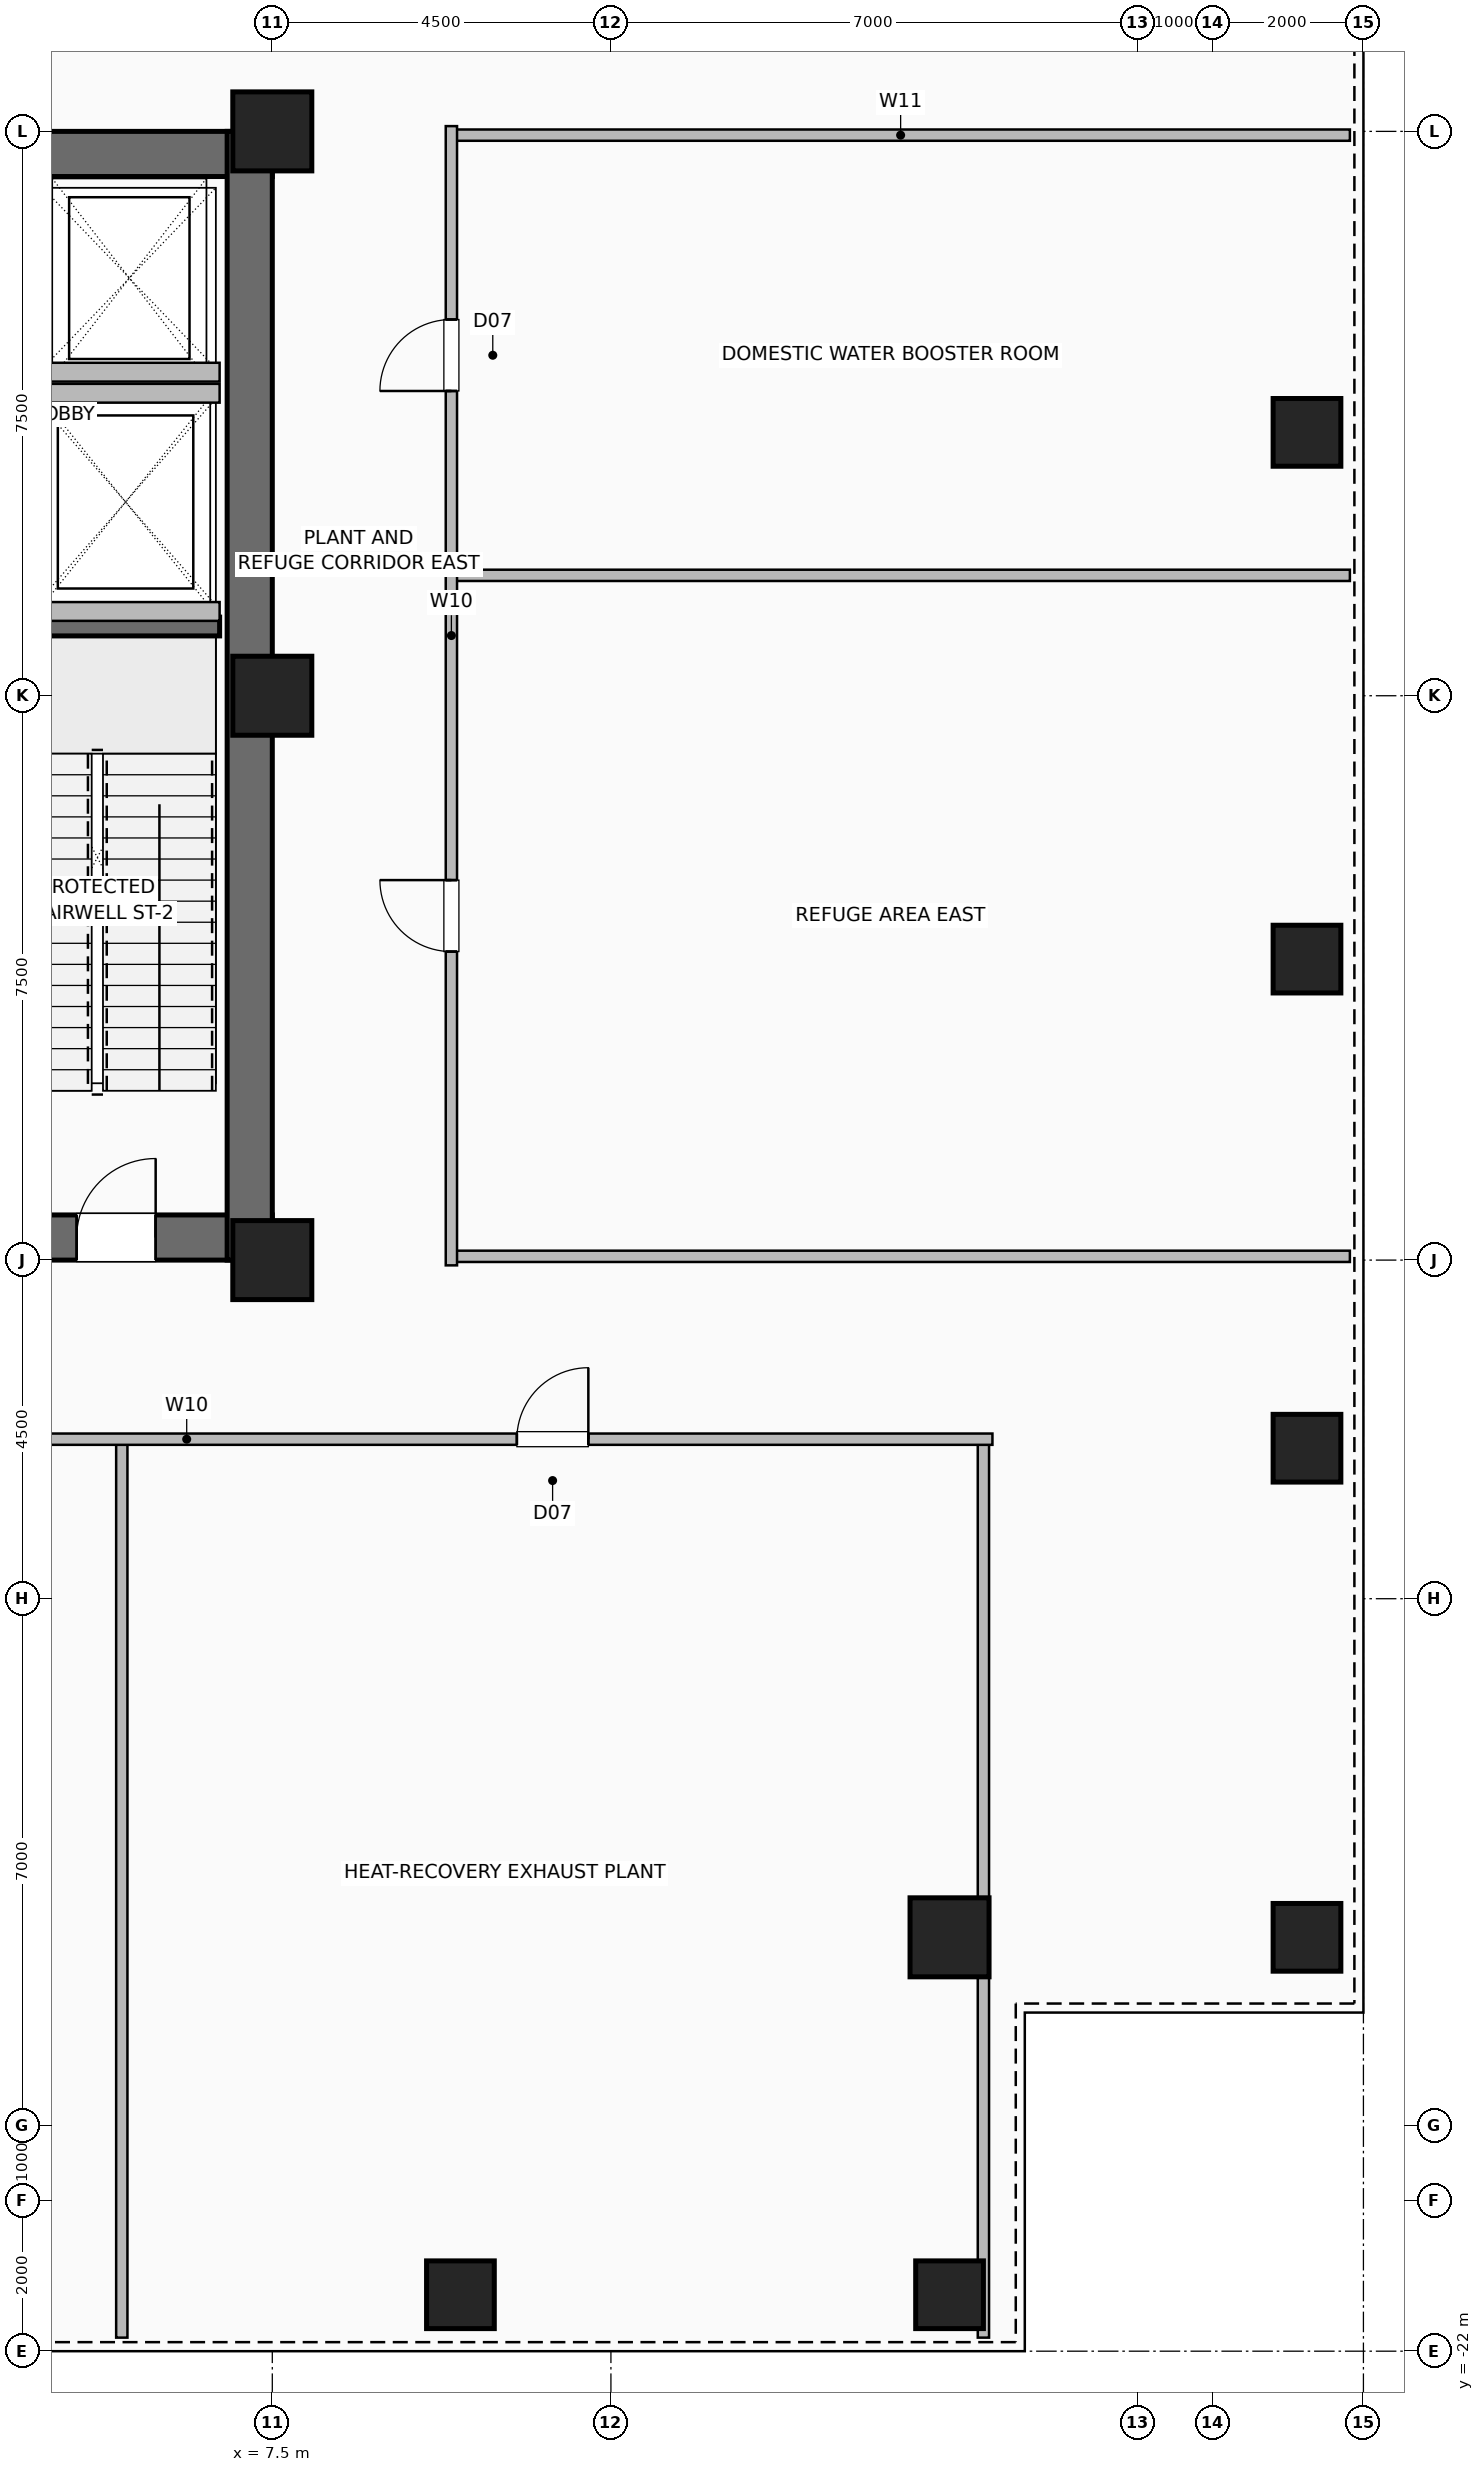
"""IFC4 building model, lengths in metres.
Left out: names, types, materials, properties, quantities, classifications, styles, units other than length and angle.
Written with IfcOpenShell. Run it as: python <this file> out.ifc"""

import sys

from ifc_helpers import new_model, si_unit, direction, frame, frame_2d, origin, origin_2d, place, context, subcontext, project, spatial, rectangle, hollow_rectangle, extrude, element, fill, save


model = new_model("IFC4")
c1 = context("Model", 3, precision=1e-05, world=origin(), true_north=direction((0.0, 1.0)))
c2 = subcontext(c1, "Body", "Model", "MODEL_VIEW")
j1 = project(units=[si_unit("LENGTHUNIT", "METRE"), si_unit("PLANEANGLEUNIT", "RADIAN")], contexts=[c1])
p1 = place(None, origin())
s1 = spatial("IfcSite", under=j1, at=p1, CompositionType="ELEMENT")
p2 = place(p1, origin())
s2 = spatial("IfcBuilding", under=s1, at=p2, CompositionType="ELEMENT")
p3 = place(p2, frame((0.0, 0.0, 160.2)))
s3 = spatial("IfcBuildingStorey", under=s2, at=p3, CompositionType="ELEMENT", Elevation=160.2)
for number, where, z_axis, x_axis in (
    (1, (7.5, -7.5, 0.0), (0.0, 0.0, 1.0), (1.0, 0.0, 0.0)),
    (2, (7.5, 0.0, 0.0), (0.0, 0.0, 1.0), (1.0, 0.0, 0.0)),
    (3, (7.5, 7.5, 0.0), (0.0, 0.0, 1.0), (1.0, 0.0, 0.0)),
):
    element("IfcColumn", number, at=place(p3, frame(where, z_axis=z_axis, x_axis=x_axis)), inside=s3, PredefinedType="COLUMN", context=c2, shape_type="SweptSolid", body=[
        extrude(hollow_rectangle(XDim=1.05, YDim=1.05, WallThickness=0.05, at=origin_2d()), origin(), (0.0, 0.0, 1.0), 6.0),
    ])
for number, where, z_axis, x_axis in (
    (4, (21.25, -16.5, 0.0), (0.0, 0.0, 1.0), (1.0, 0.0, 0.0)),
    (5, (21.25, -10.0, 0.0), (0.0, 0.0, 1.0), (1.0, 0.0, 0.0)),
    (6, (21.25, -3.5, 0.0), (0.0, 0.0, 1.0), (1.0, 0.0, 0.0)),
    (7, (21.25, 3.5, 0.0), (0.0, 0.0, 1.0), (1.0, 0.0, 0.0)),
    (8, (10.0, -21.25, 0.0), (0.0, 0.0, 1.0), (1.0, 0.0, 0.0)),
    (9, (16.5, -21.25, 0.0), (0.0, 0.0, 1.0), (1.0, 0.0, 0.0)),
):
    element("IfcColumn", number, at=place(p3, frame(where, z_axis=z_axis, x_axis=x_axis)), inside=s3, PredefinedType="COLUMN", context=c2, shape_type="SweptSolid", body=[
        extrude(hollow_rectangle(XDim=0.9, YDim=0.9, WallThickness=0.045, at=origin_2d()), origin(), (0.0, 0.0, 1.0), 5.6),
    ])
p4 = place(p3, frame((16.5, -16.5, 0.0), z_axis=(0.0, 0.0, 1.0), x_axis=(1.0, 0.0, 0.0)))
e10 = element("IfcColumn", 10, at=p4, inside=s3, PredefinedType="COLUMN", context=c2, shape_type="SweptSolid", body=[
    extrude(hollow_rectangle(XDim=1.05, YDim=1.05, WallThickness=0.05, at=origin_2d()), origin(), (0.0, 0.0, 1.0), 5.6),
])
p5 = place(p3, frame((-7.5, -7.2, 0.0), z_axis=(0.0, 0.0, 1.0), x_axis=(1.0, 0.0, 0.0)))
e11 = element("IfcWall", 11, at=p5, inside=s3, PredefinedType="SHEAR", context=c2, shape_type="SweptSolid", body=[
    extrude(rectangle(XDim=15.0, YDim=0.6, at=frame_2d((7.5, 0.0))), origin(), (0.0, 0.0, 1.0), 5.6),
])
p6 = place(p5, frame((1.55, 0.0, 0.0)))
e12 = element("IfcOpeningElement", 12, at=p6, cuts=e11, PredefinedType="OPENING", context=c2, shape_type="SweptSolid", body=[
    extrude(rectangle(XDim=1.05, YDim=2.08, at=frame_2d((0.525, 1.04))), frame((0.0, 0.31, 0.0), z_axis=(0.0, -1.0, 0.0), x_axis=(1.0, 0.0, 0.0)), (0.0, 0.0, 1.0), 0.62),
])
p7 = place(p5, frame((12.4, 0.0, 0.0)))
e13 = element("IfcOpeningElement", 13, at=p7, cuts=e11, PredefinedType="OPENING", context=c2, shape_type="SweptSolid", body=[
    extrude(rectangle(XDim=1.05, YDim=2.08, at=frame_2d((0.525, 1.04))), frame((0.0, 0.31, 0.0), z_axis=(0.0, -1.0, 0.0), x_axis=(1.0, 0.0, 0.0)), (0.0, 0.0, 1.0), 0.62),
])
p8 = place(p5, frame((4.95, 0.0, 0.0)))
e14 = element("IfcOpeningElement", 14, at=p8, cuts=e11, PredefinedType="OPENING", context=c2, shape_type="SweptSolid", body=[
    extrude(rectangle(XDim=1.0, YDim=2.08, at=frame_2d((0.5, 1.04))), frame((0.0, 0.31, 0.0), z_axis=(0.0, -1.0, 0.0), x_axis=(1.0, 0.0, 0.0)), (0.0, 0.0, 1.0), 0.62),
])
p9 = place(p5, frame((7.05, 0.0, 0.0)))
e15 = element("IfcOpeningElement", 15, at=p9, cuts=e11, PredefinedType="OPENING", context=c2, shape_type="SweptSolid", body=[
    extrude(rectangle(XDim=1.0, YDim=2.08, at=frame_2d((0.5, 1.04))), frame((0.0, 0.31, 0.0), z_axis=(0.0, -1.0, 0.0), x_axis=(1.0, 0.0, 0.0)), (0.0, 0.0, 1.0), 0.62),
])
p10 = place(p5, frame((9.15, 0.0, 0.0)))
e16 = element("IfcOpeningElement", 16, at=p10, cuts=e11, PredefinedType="OPENING", context=c2, shape_type="SweptSolid", body=[
    extrude(rectangle(XDim=1.0, YDim=2.08, at=frame_2d((0.5, 1.04))), frame((0.0, 0.31, 0.0), z_axis=(0.0, -1.0, 0.0), x_axis=(1.0, 0.0, 0.0)), (0.0, 0.0, 1.0), 0.62),
])
for number, where, z_axis, x_axis in (
    (17, (-7.5, 7.2, 0.0), (0.0, 0.0, 1.0), (1.0, 0.0, 0.0)),
    (18, (7.2, -7.5, 0.0), (0.0, 0.0, 1.0), (0.0, 1.0, 0.0)),
):
    element("IfcWall", number, at=place(p3, frame(where, z_axis=z_axis, x_axis=x_axis)), inside=s3, PredefinedType="SHEAR", context=c2, shape_type="SweptSolid", body=[
        extrude(rectangle(XDim=15.0, YDim=0.6, at=frame_2d((7.5, 0.0))), origin(), (0.0, 0.0, 1.0), 5.6),
    ])
p11 = place(p3, frame((3.47, 0.92, 0.0), z_axis=(0.0, 0.0, 1.0), x_axis=(1.0, 0.0, 0.0)))
e19 = element("IfcWall", 19, at=p11, inside=s3, PredefinedType="SHEAR", context=c2, shape_type="SweptSolid", body=[
    extrude(rectangle(XDim=3.33, YDim=0.25, at=frame_2d((1.665, 0.0))), origin(), (0.0, 0.0, 1.0), 5.6),
])
p12 = place(p3, frame((4.38, 4.3, 0.0), z_axis=(0.0, 0.0, 1.0), x_axis=(1.0, 0.0, 0.0)))
e20 = element("IfcWall", 20, at=p12, inside=s3, PredefinedType="SHEAR", context=c2, shape_type="SweptSolid", body=[
    extrude(rectangle(XDim=2.42, YDim=0.25, at=frame_2d((1.21, 0.0))), origin(), (0.0, 0.0, 1.0), 5.6),
])
for number, where, z_axis, x_axis in (
    (21, (4.28, 1.12, 0.0), (0.0, 0.0, 1.0), (1.0, 0.0, 0.0)),
    (22, (4.28, 4.02, 0.0), (0.0, 0.0, 1.0), (1.0, 0.0, 0.0)),
):
    element("IfcWall", number, at=place(p3, frame(where, z_axis=z_axis, x_axis=x_axis)), inside=s3, PredefinedType="SHEAR", context=c2, shape_type="SweptSolid", body=[
        extrude(rectangle(XDim=2.52, YDim=0.25, at=frame_2d((1.26, 0.0))), origin(), (0.0, 0.0, 1.0), 5.6),
    ])
for number, where, z_axis, x_axis in (
    (23, (5.5, -21.82, 0.0), (0.0, 0.0, 1.0), (0.0, 1.0, 0.0)),
    (24, (16.95, -21.82, 0.0), (0.0, 0.0, 1.0), (0.0, 1.0, 0.0)),
):
    element("IfcWall", number, at=place(p3, frame(where, z_axis=z_axis, x_axis=x_axis)), inside=s3, PredefinedType="PARTITIONING", context=c2, shape_type="SweptSolid", body=[
        extrude(rectangle(XDim=11.94, YDim=0.15, at=frame_2d((5.97, 0.0))), origin(), (0.0, 0.0, 1.0), 5.6),
    ])
p13 = place(p3, frame((-17.07, -9.88, 0.0), z_axis=(0.0, 0.0, 1.0), x_axis=(1.0, 0.0, 0.0)))
e25 = element("IfcWall", 25, at=p13, inside=s3, PredefinedType="PARTITIONING", context=c2, shape_type="SweptSolid", body=[
    extrude(rectangle(XDim=34.14, YDim=0.15, at=frame_2d((17.07, 0.0))), origin(), (0.0, 0.0, 1.0), 5.6),
])
p14 = place(p13, frame((5.37, 0.0, 0.0)))
e26 = element("IfcOpeningElement", 26, at=p14, cuts=e25, PredefinedType="OPENING", context=c2, shape_type="SweptSolid", body=[
    extrude(rectangle(XDim=0.95, YDim=2.06, at=frame_2d((0.475, 1.03))), frame((0.0, 0.085, 0.0), z_axis=(0.0, -1.0, 0.0), x_axis=(1.0, 0.0, 0.0)), (0.0, 0.0, 1.0), 0.17),
])
p15 = place(p13, frame((11.825, 0.0, 0.0)))
e27 = element("IfcOpeningElement", 27, at=p15, cuts=e25, PredefinedType="OPENING", context=c2, shape_type="SweptSolid", body=[
    extrude(rectangle(XDim=0.85, YDim=2.05, at=frame_2d((0.425, 1.025))), frame((0.0, 0.085, 0.0), z_axis=(0.0, -1.0, 0.0), x_axis=(1.0, 0.0, 0.0)), (0.0, 0.0, 1.0), 0.17),
])
p16 = place(p13, frame((13.275, 0.0, 0.0)))
e28 = element("IfcOpeningElement", 28, at=p16, cuts=e25, PredefinedType="OPENING", context=c2, shape_type="SweptSolid", body=[
    extrude(rectangle(XDim=0.95, YDim=2.06, at=frame_2d((0.475, 1.03))), frame((0.0, 0.085, 0.0), z_axis=(0.0, -1.0, 0.0), x_axis=(1.0, 0.0, 0.0)), (0.0, 0.0, 1.0), 0.17),
])
p17 = place(p13, frame((18.095, 0.0, 0.0)))
e29 = element("IfcOpeningElement", 29, at=p17, cuts=e25, PredefinedType="OPENING", context=c2, shape_type="SweptSolid", body=[
    extrude(rectangle(XDim=0.95, YDim=2.06, at=frame_2d((0.475, 1.03))), frame((0.0, 0.085, 0.0), z_axis=(0.0, -1.0, 0.0), x_axis=(1.0, 0.0, 0.0)), (0.0, 0.0, 1.0), 0.17),
])
p18 = place(p13, frame((27.82, 0.0, 0.0)))
e30 = element("IfcOpeningElement", 30, at=p18, cuts=e25, PredefinedType="OPENING", context=c2, shape_type="SweptSolid", body=[
    extrude(rectangle(XDim=0.95, YDim=2.06, at=frame_2d((0.475, 1.03))), frame((0.0, 0.085, 0.0), z_axis=(0.0, -1.0, 0.0), x_axis=(1.0, 0.0, 0.0)), (0.0, 0.0, 1.0), 0.17),
])
p19 = place(p3, frame((9.88, -7.45, 0.0), z_axis=(0.0, 0.0, 1.0), x_axis=(1.0, 0.0, 0.0)))
e31 = element("IfcWall", 31, at=p19, inside=s3, PredefinedType="PARTITIONING", context=c2, shape_type="SweptSolid", body=[
    extrude(rectangle(XDim=11.94, YDim=0.15, at=frame_2d((5.97, 0.0))), origin(), (0.0, 0.0, 1.0), 3.975),
])
p20 = place(p3, frame((9.88, 1.6, 0.0), z_axis=(0.0, 0.0, 1.0), x_axis=(1.0, 0.0, 0.0)))
e32 = element("IfcWall", 32, at=p20, inside=s3, PredefinedType="PARTITIONING", context=c2, shape_type="SweptSolid", body=[
    extrude(rectangle(XDim=11.94, YDim=0.15, at=frame_2d((5.97, 0.0))), origin(), (0.0, 0.0, 1.0), 5.6),
])
p21 = place(p3, frame((9.88, 7.45, 0.0), z_axis=(0.0, 0.0, 1.0), x_axis=(1.0, 0.0, 0.0)))
e33 = element("IfcWall", 33, at=p21, inside=s3, PredefinedType="PARTITIONING", context=c2, shape_type="SweptSolid", body=[
    extrude(rectangle(XDim=11.94, YDim=0.15, at=frame_2d((5.97, 0.0))), origin(), (0.0, 0.0, 1.0), 3.975),
])
p22 = place(p3, frame((9.88, -7.57, 0.0), z_axis=(0.0, 0.0, 1.0), x_axis=(0.0, 1.0, 0.0)))
e34 = element("IfcWall", 34, at=p22, inside=s3, PredefinedType="PARTITIONING", context=c2, shape_type="SweptSolid", body=[
    extrude(rectangle(XDim=15.14, YDim=0.15, at=frame_2d((7.57, 0.0))), origin(), (0.0, 0.0, 1.0), 5.6),
])
p23 = place(p22, frame((4.17, 0.0, 0.0)))
e35 = element("IfcOpeningElement", 35, at=p23, cuts=e34, PredefinedType="OPENING", context=c2, shape_type="SweptSolid", body=[
    extrude(rectangle(XDim=0.95, YDim=2.06, at=frame_2d((0.475, 1.03))), frame((0.0, 0.085, 0.0), z_axis=(0.0, -1.0, 0.0), x_axis=(1.0, 0.0, 0.0)), (0.0, 0.0, 1.0), 0.17),
])
p24 = place(p22, frame((11.62, 0.0, 0.0)))
e36 = element("IfcOpeningElement", 36, at=p24, cuts=e34, PredefinedType="OPENING", context=c2, shape_type="SweptSolid", body=[
    extrude(rectangle(XDim=0.95, YDim=2.06, at=frame_2d((0.475, 1.03))), frame((0.0, 0.085, 0.0), z_axis=(0.0, -1.0, 0.0), x_axis=(1.0, 0.0, 0.0)), (0.0, 0.0, 1.0), 0.17),
])
p25 = place(p7, origin())
e37 = element("IfcDoor", 37, at=p25, inside=s3, OperationType="SINGLE_SWING_RIGHT", PredefinedType="DOOR", context=c2, shape_type="SweptSolid", body=[
    extrude(rectangle(XDim=1.05, YDim=2.08, at=frame_2d((0.525, 1.04))), frame((0.0, 0.025, 0.0), z_axis=(0.0, -1.0, 0.0), x_axis=(1.0, 0.0, 0.0)), (0.0, 0.0, 1.0), 0.05),
])
fill(e13, e37)
p26 = place(p18, origin())
e38 = element("IfcDoor", 38, at=p26, inside=s3, OperationType="SINGLE_SWING_RIGHT", PredefinedType="DOOR", context=c2, shape_type="SweptSolid", body=[
    extrude(rectangle(XDim=0.95, YDim=2.06, at=frame_2d((0.475, 1.03))), frame((0.0, 0.025, 0.0), z_axis=(0.0, -1.0, 0.0), x_axis=(1.0, 0.0, 0.0)), (0.0, 0.0, 1.0), 0.05),
])
fill(e30, e38)
p27 = place(p23, origin())
e39 = element("IfcDoor", 39, at=p27, inside=s3, OperationType="SINGLE_SWING_RIGHT", PredefinedType="DOOR", context=c2, shape_type="SweptSolid", body=[
    extrude(rectangle(XDim=0.95, YDim=2.06, at=frame_2d((0.475, 1.03))), frame((0.0, 0.025, 0.0), z_axis=(0.0, -1.0, 0.0), x_axis=(1.0, 0.0, 0.0)), (0.0, 0.0, 1.0), 0.05),
])
fill(e35, e39)
p28 = place(p24, origin())
e40 = element("IfcDoor", 40, at=p28, inside=s3, OperationType="SINGLE_SWING_LEFT", PredefinedType="DOOR", context=c2, shape_type="SweptSolid", body=[
    extrude(rectangle(XDim=0.95, YDim=2.06, at=frame_2d((0.475, 1.03))), frame((0.0, 0.025, 0.0), z_axis=(0.0, -1.0, 0.0), x_axis=(1.0, 0.0, 0.0)), (0.0, 0.0, 1.0), 0.05),
])
fill(e36, e40)
save(model, sys.argv[1])
